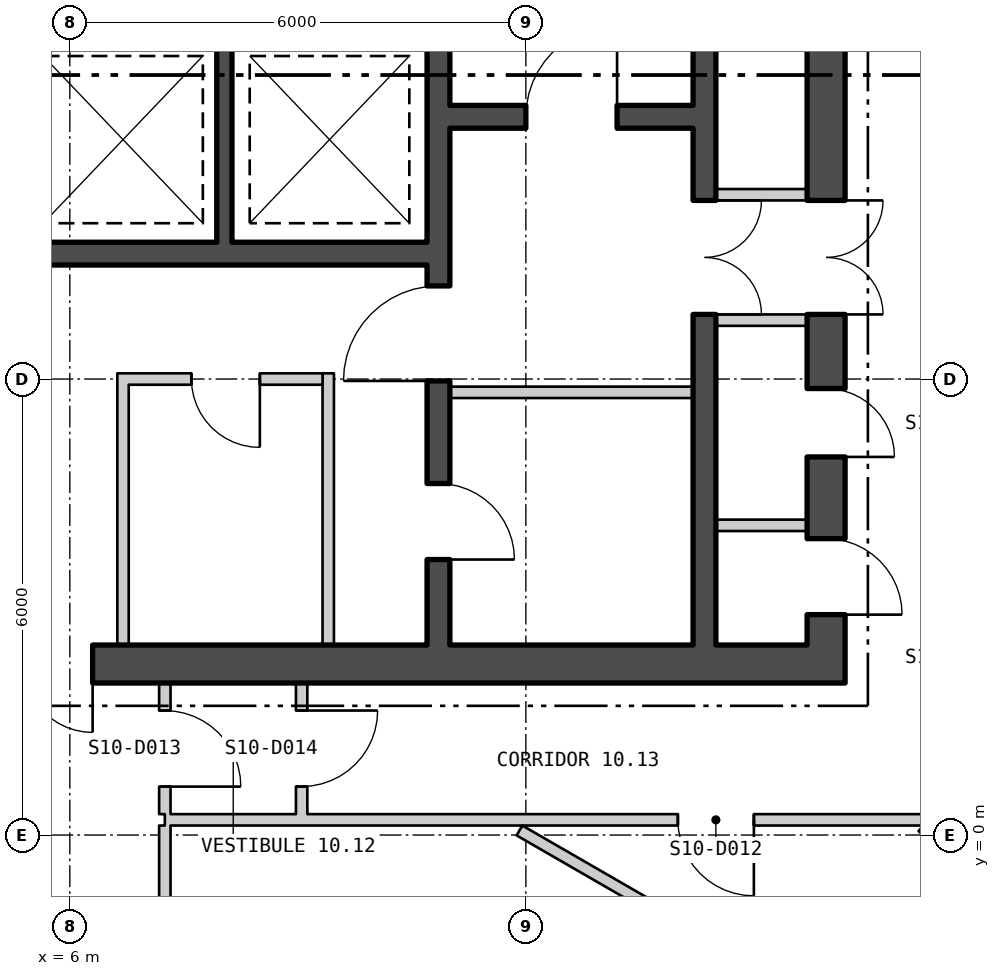
"""IFC4 building model, lengths in metres.
Left out: names, types, materials, properties, quantities, classifications, styles, units other than length and angle.
Written with IfcOpenShell. Run it as: python <this file> out.ifc"""

import sys

from ifc_helpers import new_model, si_unit, direction, frame, frame_2d, origin, place, context, subcontext, project, spatial, polyline, rectangle, outline, extrude, element, fill, save


model = new_model("IFC4")
c1 = context("Model", 3, precision=1e-05, world=origin(), true_north=direction((0.0, 1.0)))
c2 = subcontext(c1, "Body", "Model", "MODEL_VIEW")
j1 = project(units=[si_unit("LENGTHUNIT", "METRE"), si_unit("PLANEANGLEUNIT", "RADIAN")], contexts=[c1])
p1 = place(None, origin())
s1 = spatial("IfcSite", under=j1, at=p1, CompositionType="ELEMENT")
p2 = place(p1, origin())
s2 = spatial("IfcBuilding", under=s1, at=p2, CompositionType="ELEMENT")
p3 = place(p2, frame((0.0, 0.0, 139.8)))
s3 = spatial("IfcBuildingStorey", under=s2, at=p3, CompositionType="ELEMENT", Elevation=139.8)
p4 = place(p3, frame((4.36, -27.198, -0.18), z_axis=(0.0, 0.0, 1.0), x_axis=(0.500000335318, 0.866025210188, 0.0)))
e1 = element("IfcWall", 1, at=p4, inside=s3, PredefinedType="SOLIDWALL", context=c2, shape_type="SweptSolid", body=[
    extrude(outline(polyline([(-0.13, -0.225), (45.88, -0.225), (45.62, 0.225), (0.13, 0.225), (-0.13, -0.225)])), origin(), (0.0, 0.0, 1.0), 3.68),
])
p5 = place(p4, frame((1.425, 0.0, 1.08)))
e2 = element("IfcOpeningElement", 2, at=p5, cuts=e1, PredefinedType="OPENING", context=c2, shape_type="SweptSolid", body=[
    extrude(rectangle(XDim=2.4, YDim=2.0, at=frame_2d((1.2, 1.0))), frame((0.0, 0.235, 0.0), z_axis=(0.0, -1.0, 0.0), x_axis=(1.0, 0.0, 0.0)), (0.0, 0.0, 1.0), 0.47),
])
p6 = place(p4, frame((5.895, 0.0, 1.08)))
e3 = element("IfcOpeningElement", 3, at=p6, cuts=e1, PredefinedType="OPENING", context=c2, shape_type="SweptSolid", body=[
    extrude(rectangle(XDim=2.4, YDim=2.0, at=frame_2d((1.2, 1.0))), frame((0.0, 0.235, 0.0), z_axis=(0.0, -1.0, 0.0), x_axis=(1.0, 0.0, 0.0)), (0.0, 0.0, 1.0), 0.47),
])
p7 = place(p4, frame((10.403, 0.0, 1.08)))
e4 = element("IfcOpeningElement", 4, at=p7, cuts=e1, PredefinedType="OPENING", context=c2, shape_type="SweptSolid", body=[
    extrude(rectangle(XDim=2.4, YDim=2.0, at=frame_2d((1.2, 1.0))), frame((0.0, 0.235, 0.0), z_axis=(0.0, -1.0, 0.0), x_axis=(1.0, 0.0, 0.0)), (0.0, 0.0, 1.0), 0.47),
])
p8 = place(p4, frame((14.912, 0.0, 1.08)))
e5 = element("IfcOpeningElement", 5, at=p8, cuts=e1, PredefinedType="OPENING", context=c2, shape_type="SweptSolid", body=[
    extrude(rectangle(XDim=2.4, YDim=2.0, at=frame_2d((1.2, 1.0))), frame((0.0, 0.235, 0.0), z_axis=(0.0, -1.0, 0.0), x_axis=(1.0, 0.0, 0.0)), (0.0, 0.0, 1.0), 0.47),
])
p9 = place(p4, frame((19.421, 0.0, 1.08)))
e6 = element("IfcOpeningElement", 6, at=p9, cuts=e1, PredefinedType="OPENING", context=c2, shape_type="SweptSolid", body=[
    extrude(rectangle(XDim=2.4, YDim=2.0, at=frame_2d((1.2, 1.0))), frame((0.0, 0.235, 0.0), z_axis=(0.0, -1.0, 0.0), x_axis=(1.0, 0.0, 0.0)), (0.0, 0.0, 1.0), 0.47),
])
p10 = place(p4, frame((23.929, 0.0, 1.08)))
e7 = element("IfcOpeningElement", 7, at=p10, cuts=e1, PredefinedType="OPENING", context=c2, shape_type="SweptSolid", body=[
    extrude(rectangle(XDim=2.4, YDim=2.0, at=frame_2d((1.2, 1.0))), frame((0.0, 0.235, 0.0), z_axis=(0.0, -1.0, 0.0), x_axis=(1.0, 0.0, 0.0)), (0.0, 0.0, 1.0), 0.47),
])
p11 = place(p4, frame((37.455, 0.0, 1.08)))
e8 = element("IfcOpeningElement", 8, at=p11, cuts=e1, PredefinedType="OPENING", context=c2, shape_type="SweptSolid", body=[
    extrude(rectangle(XDim=2.4, YDim=2.0, at=frame_2d((1.2, 1.0))), frame((0.0, 0.235, 0.0), z_axis=(0.0, -1.0, 0.0), x_axis=(1.0, 0.0, 0.0)), (0.0, 0.0, 1.0), 0.47),
])
p12 = place(p4, frame((41.925, 0.0, 1.08)))
e9 = element("IfcOpeningElement", 9, at=p12, cuts=e1, PredefinedType="OPENING", context=c2, shape_type="SweptSolid", body=[
    extrude(rectangle(XDim=2.4, YDim=2.0, at=frame_2d((1.2, 1.0))), frame((0.0, 0.235, 0.0), z_axis=(0.0, -1.0, 0.0), x_axis=(1.0, 0.0, 0.0)), (0.0, 0.0, 1.0), 0.47),
])
p13 = place(p3, frame((-16.2, 2.25, 0.0), z_axis=(0.0, 0.0, 1.0), x_axis=(1.0, 0.0, 0.0)))
e10 = element("IfcWall", 10, at=p13, inside=s3, PredefinedType="SHEAR", context=c2, shape_type="SweptSolid", body=[
    extrude(rectangle(XDim=32.4, YDim=0.5, at=frame_2d((16.2, 0.0))), origin(), (0.0, 0.0, 1.0), 3.7),
])
p14 = place(p13, frame((10.7, 0.0, 0.0)))
e11 = element("IfcOpeningElement", 11, at=p14, cuts=e10, PredefinedType="OPENING", context=c2, shape_type="SweptSolid", body=[
    extrude(rectangle(XDim=1.8, YDim=2.4, at=frame_2d((0.9, 1.2))), frame((0.0, 0.26, 0.0), z_axis=(0.0, -1.0, 0.0), x_axis=(1.0, 0.0, 0.0)), (0.0, 0.0, 1.0), 0.52),
])
p15 = place(p13, frame((20.7, 0.0, 0.0)))
e12 = element("IfcOpeningElement", 12, at=p15, cuts=e10, PredefinedType="OPENING", context=c2, shape_type="SweptSolid", body=[
    extrude(rectangle(XDim=1.8, YDim=2.4, at=frame_2d((0.9, 1.2))), frame((0.0, 0.26, 0.0), z_axis=(0.0, -1.0, 0.0), x_axis=(1.0, 0.0, 0.0)), (0.0, 0.0, 1.0), 0.52),
])
p16 = place(p3, frame((15.95, 2.5, 0.0), z_axis=(0.0, 0.0, 1.0), x_axis=(0.0, 1.0, 0.0)))
e13 = element("IfcWall", 13, at=p16, inside=s3, PredefinedType="SHEAR", context=c2, shape_type="SweptSolid", body=[
    extrude(rectangle(XDim=15.0, YDim=0.5, at=frame_2d((7.5, 0.0))), origin(), (0.0, 0.0, 1.0), 3.7),
])
p17 = place(p16, frame((4.35, 0.0, 0.0)))
e14 = element("IfcOpeningElement", 14, at=p17, cuts=e13, PredefinedType="OPENING", context=c2, shape_type="SweptSolid", body=[
    extrude(rectangle(XDim=1.5, YDim=2.1, at=frame_2d((0.75, 1.05))), frame((0.0, 0.26, 0.0), z_axis=(0.0, -1.0, 0.0), x_axis=(1.0, 0.0, 0.0)), (0.0, 0.0, 1.0), 0.52),
])
p18 = place(p16, frame((0.4, 0.0, 0.0)))
e15 = element("IfcOpeningElement", 15, at=p18, cuts=e13, PredefinedType="OPENING", context=c2, shape_type="SweptSolid", body=[
    extrude(rectangle(XDim=1.0, YDim=2.1, at=frame_2d((0.5, 1.05))), frame((0.0, 0.26, 0.0), z_axis=(0.0, -1.0, 0.0), x_axis=(1.0, 0.0, 0.0)), (0.0, 0.0, 1.0), 0.52),
])
p19 = place(p16, frame((2.475, 0.0, 0.0)))
e16 = element("IfcOpeningElement", 16, at=p19, cuts=e13, PredefinedType="OPENING", context=c2, shape_type="SweptSolid", body=[
    extrude(rectangle(XDim=0.9, YDim=2.1, at=frame_2d((0.45, 1.05))), frame((0.0, 0.26, 0.0), z_axis=(0.0, -1.0, 0.0), x_axis=(1.0, 0.0, 0.0)), (0.0, 0.0, 1.0), 0.52),
])
p20 = place(p16, frame((9.001, 0.0, 0.0)))
e17 = element("IfcOpeningElement", 17, at=p20, cuts=e13, PredefinedType="OPENING", context=c2, shape_type="SweptSolid", body=[
    extrude(rectangle(XDim=0.9, YDim=2.1, at=frame_2d((0.45, 1.05))), frame((0.0, 0.26, 0.0), z_axis=(0.0, -1.0, 0.0), x_axis=(1.0, 0.0, 0.0)), (0.0, 0.0, 1.0), 0.52),
])
p21 = place(p16, frame((13.576, 0.0, 0.0)))
e18 = element("IfcOpeningElement", 18, at=p21, cuts=e13, PredefinedType="OPENING", context=c2, shape_type="SweptSolid", body=[
    extrude(rectangle(XDim=0.9, YDim=2.1, at=frame_2d((0.45, 1.05))), frame((0.0, 0.26, 0.0), z_axis=(0.0, -1.0, 0.0), x_axis=(1.0, 0.0, 0.0)), (0.0, 0.0, 1.0), 0.52),
])
p22 = place(p3, frame((10.85, 2.5, 0.0), z_axis=(0.0, 0.0, 1.0), x_axis=(0.0, 1.0, 0.0)))
e19 = element("IfcWall", 19, at=p22, inside=s3, PredefinedType="SHEAR", context=c2, shape_type="SweptSolid", body=[
    extrude(rectangle(XDim=15.0, YDim=0.3, at=frame_2d((7.5, 0.0))), origin(), (0.0, 0.0, 1.0), 3.7),
])
p23 = place(p22, frame((3.475, 0.0, 0.0)))
e20 = element("IfcOpeningElement", 20, at=p23, cuts=e19, PredefinedType="OPENING", context=c2, shape_type="SweptSolid", body=[
    extrude(rectangle(XDim=1.25, YDim=2.1, at=frame_2d((0.625, 1.05))), frame((0.0, 0.16, 0.0), z_axis=(0.0, -1.0, 0.0), x_axis=(1.0, 0.0, 0.0)), (0.0, 0.0, 1.0), 0.32),
])
p24 = place(p22, frame((1.125, 0.0, 0.0)))
e21 = element("IfcOpeningElement", 21, at=p24, cuts=e19, PredefinedType="OPENING", context=c2, shape_type="SweptSolid", body=[
    extrude(rectangle(XDim=1.0, YDim=2.1, at=frame_2d((0.5, 1.05))), frame((0.0, 0.16, 0.0), z_axis=(0.0, -1.0, 0.0), x_axis=(1.0, 0.0, 0.0)), (0.0, 0.0, 1.0), 0.32),
])
p25 = place(p3, frame((14.35, 2.5, 0.0), z_axis=(0.0, 0.0, 1.0), x_axis=(0.0, 1.0, 0.0)))
e22 = element("IfcWall", 22, at=p25, inside=s3, PredefinedType="SHEAR", context=c2, shape_type="SweptSolid", body=[
    extrude(rectangle(XDim=15.0, YDim=0.3, at=frame_2d((7.5, 0.0))), origin(), (0.0, 0.0, 1.0), 3.7),
])
p26 = place(p25, frame((4.35, 0.0, 0.0)))
e23 = element("IfcOpeningElement", 23, at=p26, cuts=e22, PredefinedType="OPENING", context=c2, shape_type="SweptSolid", body=[
    extrude(rectangle(XDim=1.5, YDim=2.1, at=frame_2d((0.75, 1.05))), frame((0.0, 0.16, 0.0), z_axis=(0.0, -1.0, 0.0), x_axis=(1.0, 0.0, 0.0)), (0.0, 0.0, 1.0), 0.32),
])
p27 = place(p3, frame((11.0, 9.45, 0.0), z_axis=(0.0, 0.0, 1.0), x_axis=(1.0, 0.0, 0.0)))
e24 = element("IfcWall", 24, at=p27, inside=s3, PredefinedType="SHEAR", context=c2, shape_type="SweptSolid", body=[
    extrude(rectangle(XDim=3.2, YDim=0.3, at=frame_2d((1.6, 0.0))), origin(), (0.0, 0.0, 1.0), 3.7),
])
p28 = place(p27, frame((1.0, 0.0, 0.0)))
e25 = element("IfcOpeningElement", 25, at=p28, cuts=e24, PredefinedType="OPENING", context=c2, shape_type="SweptSolid", body=[
    extrude(rectangle(XDim=1.2, YDim=2.1, at=frame_2d((0.6, 1.05))), frame((0.0, 0.16, 0.0), z_axis=(0.0, -1.0, 0.0), x_axis=(1.0, 0.0, 0.0)), (0.0, 0.0, 1.0), 0.32),
])
p29 = place(p3, frame((2.6, 7.65, 0.0), z_axis=(0.0, 0.0, 1.0), x_axis=(1.0, 0.0, 0.0)))
e26 = element("IfcWall", 26, at=p29, inside=s3, PredefinedType="SHEAR", context=c2, shape_type="SweptSolid", body=[
    extrude(rectangle(XDim=8.1, YDim=0.3, at=frame_2d((4.05, 0.0))), origin(), (0.0, 0.0, 1.0), 3.7),
])
p30 = place(p3, frame((8.033, 7.8, 0.0), z_axis=(0.0, 0.0, 1.0), x_axis=(0.0, 1.0, 0.0)))
e27 = element("IfcWall", 27, at=p30, inside=s3, PredefinedType="SHEAR", context=c2, shape_type="SweptSolid", body=[
    extrude(rectangle(XDim=2.7, YDim=0.2, at=frame_2d((1.35, 0.0))), origin(), (0.0, 0.0, 1.0), 3.7),
])
p31 = place(p3, frame((11.0, 5.825, 0.0), z_axis=(0.0, 0.0, 1.0), x_axis=(1.0, 0.0, 0.0)))
e28 = element("IfcWall", 28, at=p31, inside=s3, PredefinedType="PARTITIONING", context=c2, shape_type="SweptSolid", body=[
    extrude(rectangle(XDim=3.2, YDim=0.15, at=frame_2d((1.6, 0.0))), origin(), (0.0, 0.0, 1.0), 3.7),
])
for number, where, z_axis, x_axis in (
    (29, (14.5, 6.775, 0.0), (0.0, 0.0, 1.0), (1.0, 0.0, 0.0)),
    (30, (14.5, 8.425, 0.0), (0.0, 0.0, 1.0), (1.0, 0.0, 0.0)),
    (31, (14.5, 4.075, 0.0), (0.0, 0.0, 1.0), (1.0, 0.0, 0.0)),
):
    element("IfcWall", number, at=place(p3, frame(where, z_axis=z_axis, x_axis=x_axis)), inside=s3, PredefinedType="PARTITIONING", context=c2, shape_type="SweptSolid", body=[
        extrude(rectangle(XDim=1.2, YDim=0.15, at=frame_2d((0.6, 0.0))), origin(), (0.0, 0.0, 1.0), 3.7),
    ])
for number, where, z_axis, x_axis in (
    (32, (6.7, 2.5, 0.0), (0.0, 0.0, 1.0), (0.0, 1.0, 0.0)),
    (33, (9.4, 2.5, 0.0), (0.0, 0.0, 1.0), (0.0, 1.0, 0.0)),
):
    element("IfcWall", number, at=place(p3, frame(where, z_axis=z_axis, x_axis=x_axis)), inside=s3, PredefinedType="PARTITIONING", context=c2, shape_type="SweptSolid", body=[
        extrude(rectangle(XDim=3.575, YDim=0.15, at=frame_2d((1.788, 0.0))), origin(), (0.0, 0.0, 1.0), 3.7),
    ])
p32 = place(p3, frame((6.775, 6.0, 0.0), z_axis=(0.0, 0.0, 1.0), x_axis=(1.0, 0.0, 0.0)))
e34 = element("IfcWall", 34, at=p32, inside=s3, PredefinedType="PARTITIONING", context=c2, shape_type="SweptSolid", body=[
    extrude(rectangle(XDim=2.55, YDim=0.15, at=frame_2d((1.275, 0.0))), origin(), (0.0, 0.0, 1.0), 3.7),
])
p33 = place(p32, frame((0.825, 0.0, 0.0)))
e35 = element("IfcOpeningElement", 35, at=p33, cuts=e34, PredefinedType="OPENING", context=c2, shape_type="SweptSolid", body=[
    extrude(rectangle(XDim=0.9, YDim=2.1, at=frame_2d((0.45, 1.05))), frame((0.0, 0.085, 0.0), z_axis=(0.0, -1.0, 0.0), x_axis=(1.0, 0.0, 0.0)), (0.0, 0.0, 1.0), 0.17),
])
p34 = place(p3, frame((7.25, -1.125, 0.0), z_axis=(0.0, 0.0, 1.0), x_axis=(0.0, 1.0, 0.0)))
e36 = element("IfcWall", 36, at=p34, inside=s3, PredefinedType="PARTITIONING", context=c2, shape_type="SweptSolid", body=[
    extrude(rectangle(XDim=1.25, YDim=0.15, at=frame_2d((0.625, 0.0))), origin(), (0.0, 0.0, 1.0), 3.7),
])
p35 = place(p3, frame((7.25, 0.2, 0.0), z_axis=(0.0, 0.0, 1.0), x_axis=(1.0, 0.0, 0.0)))
e37 = element("IfcWall", 37, at=p35, inside=s3, PredefinedType="PARTITIONING", context=c2, shape_type="SweptSolid", body=[
    extrude(rectangle(XDim=10.675, YDim=0.15, at=frame_2d((5.338, 0.0))), origin(), (0.0, 0.0, 1.0), 3.7),
])
p36 = place(p35, frame((6.75, 0.0, 0.0)))
e38 = element("IfcOpeningElement", 38, at=p36, cuts=e37, PredefinedType="OPENING", context=c2, shape_type="SweptSolid", body=[
    extrude(rectangle(XDim=1.0, YDim=2.1, at=frame_2d((0.5, 1.05))), frame((0.0, 0.085, 0.0), z_axis=(0.0, -1.0, 0.0), x_axis=(1.0, 0.0, 0.0)), (0.0, 0.0, 1.0), 0.17),
])
p37 = place(p3, frame((7.25, 0.275, 0.0), z_axis=(0.0, 0.0, 1.0), x_axis=(0.0, 1.0, 0.0)))
e39 = element("IfcWall", 39, at=p37, inside=s3, PredefinedType="PARTITIONING", context=c2, shape_type="SweptSolid", body=[
    extrude(rectangle(XDim=1.725, YDim=0.15, at=frame_2d((0.863, 0.0))), origin(), (0.0, 0.0, 1.0), 3.7),
])
p38 = place(p37, frame((0.362, 0.0, 0.0)))
e40 = element("IfcOpeningElement", 40, at=p38, cuts=e39, PredefinedType="OPENING", context=c2, shape_type="SweptSolid", body=[
    extrude(rectangle(XDim=1.0, YDim=2.1, at=frame_2d((0.5, 1.05))), frame((0.0, 0.085, 0.0), z_axis=(0.0, -1.0, 0.0), x_axis=(1.0, 0.0, 0.0)), (0.0, 0.0, 1.0), 0.17),
])
p39 = place(p3, frame((9.05, 0.275, 0.0), z_axis=(0.0, 0.0, 1.0), x_axis=(0.0, 1.0, 0.0)))
e41 = element("IfcWall", 41, at=p39, inside=s3, PredefinedType="PARTITIONING", context=c2, shape_type="SweptSolid", body=[
    extrude(rectangle(XDim=1.725, YDim=0.15, at=frame_2d((0.863, 0.0))), origin(), (0.0, 0.0, 1.0), 3.7),
])
p40 = place(p39, frame((0.363, 0.0, 0.0)))
e42 = element("IfcOpeningElement", 42, at=p40, cuts=e41, PredefinedType="OPENING", context=c2, shape_type="SweptSolid", body=[
    extrude(rectangle(XDim=1.0, YDim=2.1, at=frame_2d((0.5, 1.05))), frame((0.0, 0.085, 0.0), z_axis=(0.0, -1.0, 0.0), x_axis=(1.0, 0.0, 0.0)), (0.0, 0.0, 1.0), 0.17),
])
p41 = place(p3, frame((11.916, 0.06, 0.0), z_axis=(0.0, 0.0, 1.0), x_axis=(0.866055709532, -0.499947505232, 0.0)))
e43 = element("IfcWall", 43, at=p41, inside=s3, PredefinedType="PARTITIONING", context=c2, shape_type="SweptSolid", body=[
    extrude(rectangle(XDim=6.411, YDim=0.15, at=frame_2d((3.205, 0.0))), origin(), (0.0, 0.0, 1.0), 3.7),
])
p42 = place(p3, frame((17.2, 0.089, 0.0), z_axis=(0.0, 0.0, 1.0), x_axis=(0.728995381281, -0.684518614846, 0.0)))
e44 = element("IfcWall", 44, at=p42, inside=s3, PredefinedType="PARTITIONING", context=c2, shape_type="SweptSolid", body=[
    extrude(rectangle(XDim=2.361, YDim=0.1, at=frame_2d((1.18, 0.0))), origin(), (0.0, 0.0, 1.0), 3.7),
])
p43 = place(p28, origin())
e45 = element("IfcDoor", 45, at=p43, inside=s3, OperationType="SINGLE_SWING_LEFT", PredefinedType="DOOR", context=c2, shape_type="SweptSolid", body=[
    extrude(rectangle(XDim=1.2, YDim=2.1, at=frame_2d((0.6, 1.05))), frame((0.0, 0.025, 0.0), z_axis=(0.0, -1.0, 0.0), x_axis=(1.0, 0.0, 0.0)), (0.0, 0.0, 1.0), 0.05),
])
fill(e25, e45)
p44 = place(p23, origin())
e46 = element("IfcDoor", 46, at=p44, inside=s3, OperationType="SINGLE_SWING_RIGHT", PredefinedType="DOOR", context=c2, shape_type="SweptSolid", body=[
    extrude(rectangle(XDim=1.25, YDim=2.1, at=frame_2d((0.625, 1.05))), frame((0.0, 0.025, 0.0), z_axis=(0.0, -1.0, 0.0), x_axis=(1.0, 0.0, 0.0)), (0.0, 0.0, 1.0), 0.05),
])
fill(e20, e46)
p45 = place(p24, origin())
e47 = element("IfcDoor", 47, at=p45, inside=s3, OperationType="SINGLE_SWING_LEFT", PredefinedType="DOOR", context=c2, shape_type="SweptSolid", body=[
    extrude(rectangle(XDim=1.0, YDim=2.1, at=frame_2d((0.5, 1.05))), frame((0.0, 0.025, 0.0), z_axis=(0.0, -1.0, 0.0), x_axis=(1.0, 0.0, 0.0)), (0.0, 0.0, 1.0), 0.05),
])
fill(e21, e47)
p46 = place(p26, origin())
e48 = element("IfcDoor", 48, at=p46, inside=s3, OperationType="DOUBLE_DOOR_SINGLE_SWING", PredefinedType="DOOR", context=c2, shape_type="SweptSolid", body=[
    extrude(rectangle(XDim=1.5, YDim=2.1, at=frame_2d((0.75, 1.05))), frame((0.0, 0.025, 0.0), z_axis=(0.0, -1.0, 0.0), x_axis=(1.0, 0.0, 0.0)), (0.0, 0.0, 1.0), 0.05),
])
fill(e23, e48)
p47 = place(p17, origin())
e49 = element("IfcDoor", 49, at=p47, inside=s3, OperationType="DOUBLE_DOOR_SINGLE_SWING", PredefinedType="DOOR", context=c2, shape_type="SweptSolid", body=[
    extrude(rectangle(XDim=1.5, YDim=2.1, at=frame_2d((0.75, 1.05))), frame((0.0, 0.025, 0.0), z_axis=(0.0, -1.0, 0.0), x_axis=(1.0, 0.0, 0.0)), (0.0, 0.0, 1.0), 0.05),
])
fill(e14, e49)
p48 = place(p18, origin())
e50 = element("IfcDoor", 50, at=p48, inside=s3, OperationType="SINGLE_SWING_LEFT", PredefinedType="DOOR", context=c2, shape_type="SweptSolid", body=[
    extrude(rectangle(XDim=1.0, YDim=2.1, at=frame_2d((0.5, 1.05))), frame((0.0, 0.025, 0.0), z_axis=(0.0, -1.0, 0.0), x_axis=(1.0, 0.0, 0.0)), (0.0, 0.0, 1.0), 0.05),
])
fill(e15, e50)
p49 = place(p19, origin())
e51 = element("IfcDoor", 51, at=p49, inside=s3, OperationType="SINGLE_SWING_LEFT", PredefinedType="DOOR", context=c2, shape_type="SweptSolid", body=[
    extrude(rectangle(XDim=0.9, YDim=2.1, at=frame_2d((0.45, 1.05))), frame((0.0, 0.025, 0.0), z_axis=(0.0, -1.0, 0.0), x_axis=(1.0, 0.0, 0.0)), (0.0, 0.0, 1.0), 0.05),
])
fill(e16, e51)
p50 = place(p33, origin())
e52 = element("IfcDoor", 52, at=p50, inside=s3, OperationType="SINGLE_SWING_RIGHT", PredefinedType="DOOR", context=c2, shape_type="SweptSolid", body=[
    extrude(rectangle(XDim=0.9, YDim=2.1, at=frame_2d((0.45, 1.05))), frame((0.0, 0.025, 0.0), z_axis=(0.0, -1.0, 0.0), x_axis=(1.0, 0.0, 0.0)), (0.0, 0.0, 1.0), 0.05),
])
fill(e35, e52)
p51 = place(p15, origin())
e53 = element("IfcDoor", 53, at=p51, inside=s3, OperationType="DOUBLE_DOOR_SINGLE_SWING", PredefinedType="DOOR", context=c2, shape_type="SweptSolid", body=[
    extrude(rectangle(XDim=1.8, YDim=2.4, at=frame_2d((0.9, 1.2))), frame((0.0, 0.025, 0.0), z_axis=(0.0, -1.0, 0.0), x_axis=(1.0, 0.0, 0.0)), (0.0, 0.0, 1.0), 0.05),
])
fill(e12, e53)
p52 = place(p36, origin())
e54 = element("IfcDoor", 54, at=p52, inside=s3, OperationType="SINGLE_SWING_RIGHT", PredefinedType="DOOR", context=c2, shape_type="SweptSolid", body=[
    extrude(rectangle(XDim=1.0, YDim=2.1, at=frame_2d((0.5, 1.05))), frame((0.0, 0.025, 0.0), z_axis=(0.0, -1.0, 0.0), x_axis=(1.0, 0.0, 0.0)), (0.0, 0.0, 1.0), 0.05),
])
fill(e38, e54)
p53 = place(p38, origin())
e55 = element("IfcDoor", 55, at=p53, inside=s3, OperationType="SINGLE_SWING_LEFT", PredefinedType="DOOR", context=c2, shape_type="SweptSolid", body=[
    extrude(rectangle(XDim=1.0, YDim=2.1, at=frame_2d((0.5, 1.05))), frame((0.0, 0.025, 0.0), z_axis=(0.0, -1.0, 0.0), x_axis=(1.0, 0.0, 0.0)), (0.0, 0.0, 1.0), 0.05),
])
fill(e40, e55)
p54 = place(p40, origin())
e56 = element("IfcDoor", 56, at=p54, inside=s3, OperationType="SINGLE_SWING_RIGHT", PredefinedType="DOOR", context=c2, shape_type="SweptSolid", body=[
    extrude(rectangle(XDim=1.0, YDim=2.1, at=frame_2d((0.5, 1.05))), frame((0.0, 0.025, 0.0), z_axis=(0.0, -1.0, 0.0), x_axis=(1.0, 0.0, 0.0)), (0.0, 0.0, 1.0), 0.05),
])
fill(e42, e56)
save(model, sys.argv[1])
